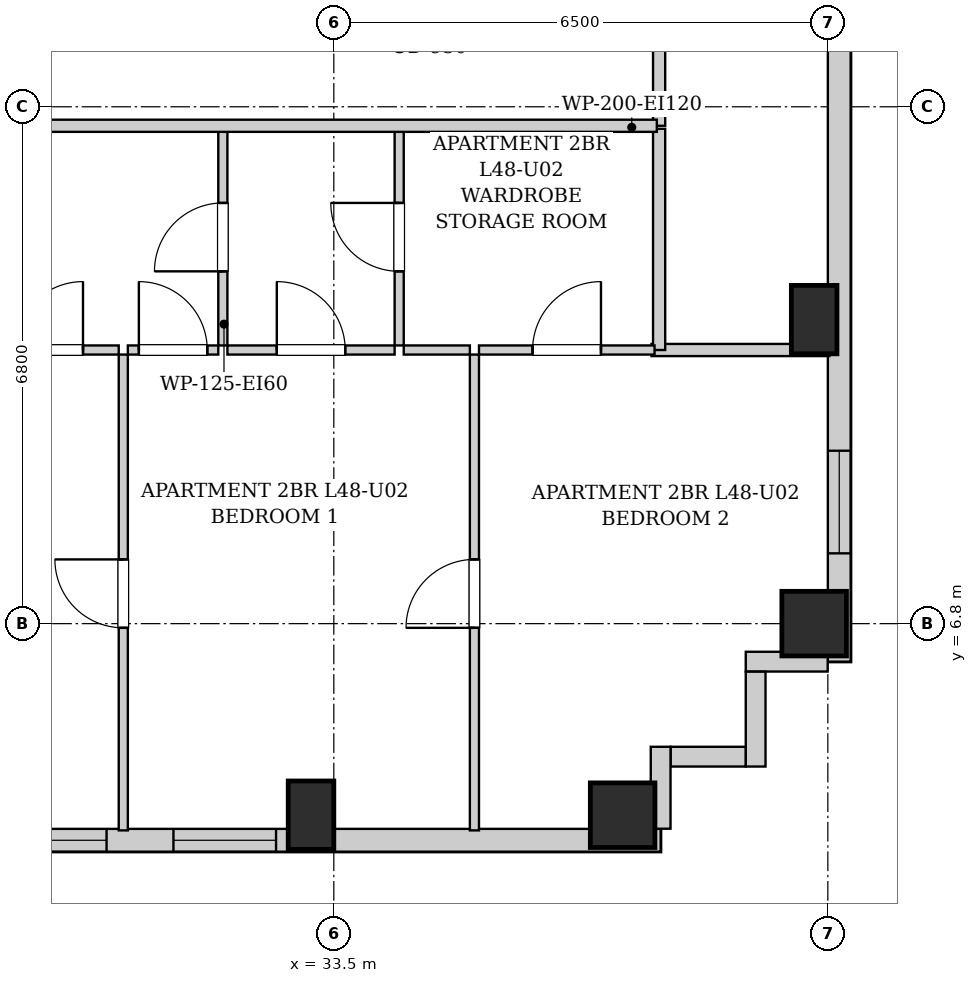
"""IFC4 building model, lengths in metres.
Left out: names, types, materials, properties, quantities, classifications, styles, units other than length and angle.
Written with IfcOpenShell. Run it as: python <this file> out.ifc"""

import sys

from ifc_helpers import new_model, si_unit, direction, frame, frame_2d, origin, origin_2d, place, context, subcontext, project, spatial, rectangle, extrude, element, fill, save


model = new_model("IFC4")
c1 = context("Model", 3, precision=1e-05, world=origin(), true_north=direction((0.0, 1.0)))
c2 = subcontext(c1, "Body", "Model", "MODEL_VIEW")
j1 = project(units=[si_unit("LENGTHUNIT", "METRE"), si_unit("PLANEANGLEUNIT", "RADIAN")], contexts=[c1])
p1 = place(None, origin())
s1 = spatial("IfcSite", under=j1, at=p1, CompositionType="ELEMENT")
p2 = place(p1, origin())
s2 = spatial("IfcBuilding", under=s1, at=p2, CompositionType="ELEMENT")
p3 = place(p2, frame((0.0, 0.0, 166.65)))
s3 = spatial("IfcBuildingStorey", under=s2, at=p3, CompositionType="ELEMENT", Elevation=166.65)
p4 = place(p3, frame((33.2, 4.28, 0.0), z_axis=(0.0, 0.0, 1.0), x_axis=(1.0, 0.0, 0.0)))
e1 = element("IfcColumn", 1, at=p4, inside=s3, PredefinedType="COLUMN", context=c2, shape_type="SweptSolid", body=[
    extrude(rectangle(XDim=0.6, YDim=0.9, at=origin_2d()), origin(), (0.0, 0.0, 1.0), 3.25),
])
for number, where, z_axis, x_axis in (
    (2, (37.3, 4.28, 0.0), (0.0, 0.0, 1.0), (1.0, 0.0, 0.0)),
    (3, (39.82, 6.8, 0.0), (0.0, 0.0, 1.0), (1.0, 0.0, 0.0)),
):
    element("IfcColumn", number, at=place(p3, frame(where, z_axis=z_axis, x_axis=x_axis)), inside=s3, PredefinedType="COLUMN", context=c2, shape_type="SweptSolid", body=[
        extrude(rectangle(XDim=0.85, YDim=0.85, at=origin_2d()), origin(), (0.0, 0.0, 1.0), 3.25),
    ])
p5 = place(p3, frame((39.82, 10.8, 0.0), z_axis=(0.0, 0.0, 1.0), x_axis=(1.0, 0.0, 0.0)))
e4 = element("IfcColumn", 4, at=p5, inside=s3, PredefinedType="COLUMN", context=c2, shape_type="SweptSolid", body=[
    extrude(rectangle(XDim=0.6, YDim=0.9, at=origin_2d()), origin(), (0.0, 0.0, 1.0), 3.25),
])
p6 = place(p3, frame((40.15, 40.8, 0.0), z_axis=(0.0, 0.0, 1.0), x_axis=(0.0, -1.0, 0.0)))
e5 = element("IfcWall", 5, at=p6, inside=s3, PredefinedType="SOLIDWALL", context=c2, shape_type="SweptSolid", body=[
    extrude(rectangle(XDim=34.5, YDim=0.3, at=frame_2d((17.25, 0.0))), origin(), (0.0, 0.0, 1.0), 2.93),
])
p7 = place(p6, frame((31.725, 0.0, 0.55)))
e6 = element("IfcOpeningElement", 6, at=p7, cuts=e5, PredefinedType="OPENING", context=c2, shape_type="SweptSolid", body=[
    extrude(rectangle(XDim=1.35, YDim=1.2, at=frame_2d((0.675, 0.6))), frame((0.0, 0.16, 0.0), z_axis=(0.0, -1.0, 0.0), x_axis=(1.0, 0.0, 0.0)), (0.0, 0.0, 1.0), 0.32),
])
p8 = place(p6, frame((3.0, 0.0, 0.55)))
e7 = element("IfcOpeningElement", 7, at=p8, cuts=e5, PredefinedType="OPENING", context=c2, shape_type="SweptSolid", body=[
    extrude(rectangle(XDim=1.35, YDim=1.2, at=frame_2d((0.675, 0.6))), frame((0.0, 0.16, 0.0), z_axis=(0.0, -1.0, 0.0), x_axis=(1.0, 0.0, 0.0)), (0.0, 0.0, 1.0), 0.32),
])
p9 = place(p6, frame((1.085, 0.0, 0.55)))
e8 = element("IfcOpeningElement", 8, at=p9, cuts=e5, PredefinedType="OPENING", context=c2, shape_type="SweptSolid", body=[
    extrude(rectangle(XDim=1.35, YDim=1.2, at=frame_2d((0.675, 0.6))), frame((0.0, 0.16, 0.0), z_axis=(0.0, -1.0, 0.0), x_axis=(1.0, 0.0, 0.0)), (0.0, 0.0, 1.0), 0.32),
])
p10 = place(p6, frame((21.3, 0.0, 0.55)))
e9 = element("IfcOpeningElement", 9, at=p10, cuts=e5, PredefinedType="OPENING", context=c2, shape_type="SweptSolid", body=[
    extrude(rectangle(XDim=1.35, YDim=1.2, at=frame_2d((0.675, 0.6))), frame((0.0, 0.16, 0.0), z_axis=(0.0, -1.0, 0.0), x_axis=(1.0, 0.0, 0.0)), (0.0, 0.0, 1.0), 0.32),
])
p11 = place(p6, frame((22.91, 0.0, 0.55)))
e10 = element("IfcOpeningElement", 10, at=p11, cuts=e5, PredefinedType="OPENING", context=c2, shape_type="SweptSolid", body=[
    extrude(rectangle(XDim=1.35, YDim=1.2, at=frame_2d((0.675, 0.6))), frame((0.0, 0.16, 0.0), z_axis=(0.0, -1.0, 0.0), x_axis=(1.0, 0.0, 0.0)), (0.0, 0.0, 1.0), 0.32),
])
p12 = place(p6, frame((14.175, 0.0, 0.55)))
e11 = element("IfcOpeningElement", 11, at=p12, cuts=e5, PredefinedType="OPENING", context=c2, shape_type="SweptSolid", body=[
    extrude(rectangle(XDim=1.35, YDim=1.2, at=frame_2d((0.675, 0.6))), frame((0.0, 0.16, 0.0), z_axis=(0.0, -1.0, 0.0), x_axis=(1.0, 0.0, 0.0)), (0.0, 0.0, 1.0), 0.32),
])
p13 = place(p6, frame((12.41, 0.0, 0.55)))
e12 = element("IfcOpeningElement", 12, at=p13, cuts=e5, PredefinedType="OPENING", context=c2, shape_type="SweptSolid", body=[
    extrude(rectangle(XDim=1.35, YDim=1.2, at=frame_2d((0.675, 0.6))), frame((0.0, 0.16, 0.0), z_axis=(0.0, -1.0, 0.0), x_axis=(1.0, 0.0, 0.0)), (0.0, 0.0, 1.0), 0.32),
])
p14 = place(p3, frame((37.8, 3.95, 0.0), z_axis=(0.0, 0.0, 1.0), x_axis=(-1.0, 0.0, 0.0)))
e13 = element("IfcWall", 13, at=p14, inside=s3, PredefinedType="SOLIDWALL", context=c2, shape_type="SweptSolid", body=[
    extrude(rectangle(XDim=20.15, YDim=0.3, at=frame_2d((10.075, 0.0))), origin(), (0.0, 0.0, 1.0), 2.93),
])
p15 = place(p14, frame((15.3, 0.0, 0.55)))
e14 = element("IfcOpeningElement", 14, at=p15, cuts=e13, PredefinedType="OPENING", context=c2, shape_type="SweptSolid", body=[
    extrude(rectangle(XDim=1.35, YDim=1.2, at=frame_2d((0.675, 0.6))), frame((0.0, 0.16, 0.0), z_axis=(0.0, -1.0, 0.0), x_axis=(1.0, 0.0, 0.0)), (0.0, 0.0, 1.0), 0.32),
])
p16 = place(p14, frame((16.91, 0.0, 0.55)))
e15 = element("IfcOpeningElement", 15, at=p16, cuts=e13, PredefinedType="OPENING", context=c2, shape_type="SweptSolid", body=[
    extrude(rectangle(XDim=1.35, YDim=1.2, at=frame_2d((0.675, 0.6))), frame((0.0, 0.16, 0.0), z_axis=(0.0, -1.0, 0.0), x_axis=(1.0, 0.0, 0.0)), (0.0, 0.0, 1.0), 0.32),
])
p17 = place(p14, frame((8.95, 0.0, 0.55)))
e16 = element("IfcOpeningElement", 16, at=p17, cuts=e13, PredefinedType="OPENING", context=c2, shape_type="SweptSolid", body=[
    extrude(rectangle(XDim=1.35, YDim=1.2, at=frame_2d((0.675, 0.6))), frame((0.0, 0.16, 0.0), z_axis=(0.0, -1.0, 0.0), x_axis=(1.0, 0.0, 0.0)), (0.0, 0.0, 1.0), 0.32),
])
p18 = place(p14, frame((7.29, 0.0, 0.55)))
e17 = element("IfcOpeningElement", 17, at=p18, cuts=e13, PredefinedType="OPENING", context=c2, shape_type="SweptSolid", body=[
    extrude(rectangle(XDim=1.35, YDim=1.2, at=frame_2d((0.675, 0.6))), frame((0.0, 0.16, 0.0), z_axis=(0.0, -1.0, 0.0), x_axis=(1.0, 0.0, 0.0)), (0.0, 0.0, 1.0), 0.32),
])
p19 = place(p14, frame((5.06, 0.0, 0.55)))
e18 = element("IfcOpeningElement", 18, at=p19, cuts=e13, PredefinedType="OPENING", context=c2, shape_type="SweptSolid", body=[
    extrude(rectangle(XDim=1.35, YDim=1.2, at=frame_2d((0.675, 0.6))), frame((0.0, 0.16, 0.0), z_axis=(0.0, -1.0, 0.0), x_axis=(1.0, 0.0, 0.0)), (0.0, 0.0, 1.0), 0.32),
])
p20 = place(p3, frame((39.998, 6.3, 0.0), z_axis=(0.0, 0.0, 1.0), x_axis=(-1.0, 0.0, 0.0)))
e19 = element("IfcWall", 19, at=p20, inside=s3, PredefinedType="SOLIDWALL", context=c2, shape_type="SweptSolid", body=[
    extrude(rectangle(XDim=1.078, YDim=0.26, at=frame_2d((0.539, 0.0))), origin(), (0.0, 0.0, 1.0), 2.93),
])
p21 = place(p3, frame((39.05, 6.168, 0.0), z_axis=(0.0, 0.0, 1.0), x_axis=(0.0, -1.0, 0.0)))
e20 = element("IfcWall", 20, at=p21, inside=s3, PredefinedType="SOLIDWALL", context=c2, shape_type="SweptSolid", body=[
    extrude(rectangle(XDim=1.248, YDim=0.26, at=frame_2d((0.624, 0.0))), origin(), (0.0, 0.0, 1.0), 2.93),
])
p22 = place(p3, frame((38.918, 5.05, 0.0), z_axis=(0.0, 0.0, 1.0), x_axis=(-1.0, 0.0, 0.0)))
e21 = element("IfcWall", 21, at=p22, inside=s3, PredefinedType="SOLIDWALL", context=c2, shape_type="SweptSolid", body=[
    extrude(rectangle(XDim=0.986, YDim=0.26, at=frame_2d((0.493, 0.0))), origin(), (0.0, 0.0, 1.0), 2.93),
])
p23 = place(p3, frame((37.8, 5.18, 0.0), z_axis=(0.0, 0.0, 1.0), x_axis=(0.0, -1.0, 0.0)))
e22 = element("IfcWall", 22, at=p23, inside=s3, PredefinedType="SOLIDWALL", context=c2, shape_type="SweptSolid", body=[
    extrude(rectangle(XDim=1.078, YDim=0.26, at=frame_2d((0.539, 0.0))), origin(), (0.0, 0.0, 1.0), 2.93),
])
p24 = place(p3, frame((37.78, 13.35, 0.0), z_axis=(0.0, 0.0, 1.0), x_axis=(0.0, 1.0, 0.0)))
e23 = element("IfcWall", 23, at=p24, inside=s3, PredefinedType="PARTITIONING", context=c2, shape_type="SweptSolid", body=[
    extrude(rectangle(XDim=1.74, YDim=0.16, at=frame_2d((0.87, 0.0))), origin(), (0.0, 0.0, 1.0), 2.93),
])
p25 = place(p3, frame((37.68, 10.4, 0.0), z_axis=(0.0, 0.0, 1.0), x_axis=(1.0, 0.0, 0.0)))
e24 = element("IfcWall", 24, at=p25, inside=s3, PredefinedType="PARTITIONING", context=c2, shape_type="SweptSolid", body=[
    extrude(rectangle(XDim=2.34, YDim=0.16, at=frame_2d((1.17, 0.0))), origin(), (0.0, 0.0, 1.0), 2.93),
])
p26 = place(p3, frame((37.78, 10.4, 0.0), z_axis=(0.0, 0.0, 1.0), x_axis=(0.0, 1.0, 0.0)))
e25 = element("IfcWall", 25, at=p26, inside=s3, PredefinedType="PARTITIONING", context=c2, shape_type="SweptSolid", body=[
    extrude(rectangle(XDim=2.91, YDim=0.16, at=frame_2d((1.455, 0.0))), origin(), (0.0, 0.0, 1.0), 2.93),
])
p27 = place(p3, frame((32.04, 10.46, 0.0), z_axis=(0.0, 0.0, 1.0), x_axis=(0.0, 1.0, 0.0)))
e26 = element("IfcWall", 26, at=p27, inside=s3, PredefinedType="PARTITIONING", context=c2, shape_type="SweptSolid", body=[
    extrude(rectangle(XDim=2.85, YDim=0.12, at=frame_2d((1.425, 0.0))), origin(), (0.0, 0.0, 1.0), 2.93),
])
p28 = place(p27, frame((0.975, 0.0, 0.0)))
e27 = element("IfcOpeningElement", 27, at=p28, cuts=e26, PredefinedType="OPENING", context=c2, shape_type="SweptSolid", body=[
    extrude(rectangle(XDim=0.9, YDim=2.05, at=frame_2d((0.45, 1.025))), frame((0.0, 0.07, 0.0), z_axis=(0.0, -1.0, 0.0), x_axis=(1.0, 0.0, 0.0)), (0.0, 0.0, 1.0), 0.14),
])
p29 = place(p3, frame((28.83, 10.4, 0.0), z_axis=(0.0, 0.0, 1.0), x_axis=(1.0, 0.0, 0.0)))
e28 = element("IfcWall", 28, at=p29, inside=s3, PredefinedType="PARTITIONING", context=c2, shape_type="SweptSolid", body=[
    extrude(rectangle(XDim=1.84, YDim=0.12, at=frame_2d((0.92, 0.0))), origin(), (0.0, 0.0, 1.0), 2.93),
])
p30 = place(p29, frame((0.47, 0.0, 0.0)))
e29 = element("IfcOpeningElement", 29, at=p30, cuts=e28, PredefinedType="OPENING", context=c2, shape_type="SweptSolid", body=[
    extrude(rectangle(XDim=0.9, YDim=2.05, at=frame_2d((0.45, 1.025))), frame((0.0, 0.07, 0.0), z_axis=(0.0, -1.0, 0.0), x_axis=(1.0, 0.0, 0.0)), (0.0, 0.0, 1.0), 0.14),
])
p31 = place(p3, frame((30.79, 10.4, 0.0), z_axis=(0.0, 0.0, 1.0), x_axis=(1.0, 0.0, 0.0)))
e30 = element("IfcWall", 30, at=p31, inside=s3, PredefinedType="PARTITIONING", context=c2, shape_type="SweptSolid", body=[
    extrude(rectangle(XDim=1.19, YDim=0.12, at=frame_2d((0.595, 0.0))), origin(), (0.0, 0.0, 1.0), 2.93),
])
p32 = place(p31, frame((0.145, 0.0, 0.0)))
e31 = element("IfcOpeningElement", 31, at=p32, cuts=e30, PredefinedType="OPENING", context=c2, shape_type="SweptSolid", body=[
    extrude(rectangle(XDim=0.9, YDim=2.05, at=frame_2d((0.45, 1.025))), frame((0.0, 0.07, 0.0), z_axis=(0.0, -1.0, 0.0), x_axis=(1.0, 0.0, 0.0)), (0.0, 0.0, 1.0), 0.14),
])
p33 = place(p3, frame((34.36, 10.46, 0.0), z_axis=(0.0, 0.0, 1.0), x_axis=(0.0, 1.0, 0.0)))
e32 = element("IfcWall", 32, at=p33, inside=s3, PredefinedType="PARTITIONING", context=c2, shape_type="SweptSolid", body=[
    extrude(rectangle(XDim=2.85, YDim=0.12, at=frame_2d((1.425, 0.0))), origin(), (0.0, 0.0, 1.0), 2.93),
])
p34 = place(p33, frame((0.975, 0.0, 0.0)))
e33 = element("IfcOpeningElement", 33, at=p34, cuts=e32, PredefinedType="OPENING", context=c2, shape_type="SweptSolid", body=[
    extrude(rectangle(XDim=0.9, YDim=2.05, at=frame_2d((0.45, 1.025))), frame((0.0, 0.07, 0.0), z_axis=(0.0, -1.0, 0.0), x_axis=(1.0, 0.0, 0.0)), (0.0, 0.0, 1.0), 0.14),
])
p35 = place(p3, frame((32.1, 10.4, 0.0), z_axis=(0.0, 0.0, 1.0), x_axis=(1.0, 0.0, 0.0)))
e34 = element("IfcWall", 34, at=p35, inside=s3, PredefinedType="PARTITIONING", context=c2, shape_type="SweptSolid", body=[
    extrude(rectangle(XDim=2.2, YDim=0.12, at=frame_2d((1.1, 0.0))), origin(), (0.0, 0.0, 1.0), 2.93),
])
p36 = place(p35, frame((0.65, 0.0, 0.0)))
e35 = element("IfcOpeningElement", 35, at=p36, cuts=e34, PredefinedType="OPENING", context=c2, shape_type="SweptSolid", body=[
    extrude(rectangle(XDim=0.9, YDim=2.05, at=frame_2d((0.45, 1.025))), frame((0.0, 0.07, 0.0), z_axis=(0.0, -1.0, 0.0), x_axis=(1.0, 0.0, 0.0)), (0.0, 0.0, 1.0), 0.14),
])
p37 = place(p3, frame((34.42, 10.4, 0.0), z_axis=(0.0, 0.0, 1.0), x_axis=(1.0, 0.0, 0.0)))
e36 = element("IfcWall", 36, at=p37, inside=s3, PredefinedType="PARTITIONING", context=c2, shape_type="SweptSolid", body=[
    extrude(rectangle(XDim=0.87, YDim=0.12, at=frame_2d((0.435, 0.0))), origin(), (0.0, 0.0, 1.0), 2.93),
])
p38 = place(p3, frame((35.41, 10.4, 0.0), z_axis=(0.0, 0.0, 1.0), x_axis=(1.0, 0.0, 0.0)))
e37 = element("IfcWall", 37, at=p38, inside=s3, PredefinedType="PARTITIONING", context=c2, shape_type="SweptSolid", body=[
    extrude(rectangle(XDim=2.31, YDim=0.12, at=frame_2d((1.155, 0.0))), origin(), (0.0, 0.0, 1.0), 2.93),
])
p39 = place(p38, frame((0.705, 0.0, 0.0)))
e38 = element("IfcOpeningElement", 38, at=p39, cuts=e37, PredefinedType="OPENING", context=c2, shape_type="SweptSolid", body=[
    extrude(rectangle(XDim=0.9, YDim=2.05, at=frame_2d((0.45, 1.025))), frame((0.0, 0.07, 0.0), z_axis=(0.0, -1.0, 0.0), x_axis=(1.0, 0.0, 0.0)), (0.0, 0.0, 1.0), 0.14),
])
p40 = place(p3, frame((30.73, 4.08, 0.0), z_axis=(0.0, 0.0, 1.0), x_axis=(0.0, 1.0, 0.0)))
e39 = element("IfcWall", 39, at=p40, inside=s3, PredefinedType="PARTITIONING", context=c2, shape_type="SweptSolid", body=[
    extrude(rectangle(XDim=6.26, YDim=0.12, at=frame_2d((3.13, 0.0))), origin(), (0.0, 0.0, 1.0), 2.93),
])
p41 = place(p40, frame((2.665, 0.0, 0.0)))
e40 = element("IfcOpeningElement", 40, at=p41, cuts=e39, PredefinedType="OPENING", context=c2, shape_type="SweptSolid", body=[
    extrude(rectangle(XDim=0.9, YDim=2.05, at=frame_2d((0.45, 1.025))), frame((0.0, 0.07, 0.0), z_axis=(0.0, -1.0, 0.0), x_axis=(1.0, 0.0, 0.0)), (0.0, 0.0, 1.0), 0.14),
])
p42 = place(p3, frame((35.35, 4.08, 0.0), z_axis=(0.0, 0.0, 1.0), x_axis=(0.0, 1.0, 0.0)))
e41 = element("IfcWall", 41, at=p42, inside=s3, PredefinedType="PARTITIONING", context=c2, shape_type="SweptSolid", body=[
    extrude(rectangle(XDim=6.26, YDim=0.12, at=frame_2d((3.13, 0.0))), origin(), (0.0, 0.0, 1.0), 2.93),
])
p43 = place(p42, frame((2.665, 0.0, 0.0)))
e42 = element("IfcOpeningElement", 42, at=p43, cuts=e41, PredefinedType="OPENING", context=c2, shape_type="SweptSolid", body=[
    extrude(rectangle(XDim=0.9, YDim=2.05, at=frame_2d((0.45, 1.025))), frame((0.0, 0.07, 0.0), z_axis=(0.0, -1.0, 0.0), x_axis=(1.0, 0.0, 0.0)), (0.0, 0.0, 1.0), 0.14),
])
p44 = place(p3, frame((10.05, 13.35, 0.0), z_axis=(0.0, 0.0, 1.0), x_axis=(1.0, 0.0, 0.0)))
e43 = element("IfcWall", 43, at=p44, inside=s3, PredefinedType="PARTITIONING", context=c2, shape_type="SweptSolid", body=[
    extrude(rectangle(XDim=27.7, YDim=0.16, at=frame_2d((13.85, 0.0))), origin(), (0.0, 0.0, 1.0), 2.93),
])
p45 = place(p44, frame((3.8, 0.0, 0.0)))
e44 = element("IfcOpeningElement", 44, at=p45, cuts=e43, PredefinedType="OPENING", context=c2, shape_type="SweptSolid", body=[
    extrude(rectangle(XDim=0.95, YDim=2.1, at=frame_2d((0.475, 1.05))), frame((0.0, 0.09, 0.0), z_axis=(0.0, -1.0, 0.0), x_axis=(1.0, 0.0, 0.0)), (0.0, 0.0, 1.0), 0.18),
])
p46 = place(p44, frame((12.695, 0.0, 0.0)))
e45 = element("IfcOpeningElement", 45, at=p46, cuts=e43, PredefinedType="OPENING", context=c2, shape_type="SweptSolid", body=[
    extrude(rectangle(XDim=0.95, YDim=2.1, at=frame_2d((0.475, 1.05))), frame((0.0, 0.09, 0.0), z_axis=(0.0, -1.0, 0.0), x_axis=(1.0, 0.0, 0.0)), (0.0, 0.0, 1.0), 0.18),
])
p47 = place(p28, origin())
e46 = element("IfcDoor", 46, at=p47, inside=s3, OperationType="SINGLE_SWING_LEFT", PredefinedType="DOOR", context=c2, shape_type="SweptSolid", body=[
    extrude(rectangle(XDim=0.9, YDim=2.05, at=frame_2d((0.45, 1.025))), frame((0.0, 0.025, 0.0), z_axis=(0.0, -1.0, 0.0), x_axis=(1.0, 0.0, 0.0)), (0.0, 0.0, 1.0), 0.05),
])
fill(e27, e46)
p48 = place(p30, origin())
e47 = element("IfcDoor", 47, at=p48, inside=s3, OperationType="SINGLE_SWING_RIGHT", PredefinedType="DOOR", context=c2, shape_type="SweptSolid", body=[
    extrude(rectangle(XDim=0.9, YDim=2.05, at=frame_2d((0.45, 1.025))), frame((0.0, 0.025, 0.0), z_axis=(0.0, -1.0, 0.0), x_axis=(1.0, 0.0, 0.0)), (0.0, 0.0, 1.0), 0.05),
])
fill(e29, e47)
p49 = place(p32, origin())
e48 = element("IfcDoor", 48, at=p49, inside=s3, OperationType="SINGLE_SWING_LEFT", PredefinedType="DOOR", context=c2, shape_type="SweptSolid", body=[
    extrude(rectangle(XDim=0.9, YDim=2.05, at=frame_2d((0.45, 1.025))), frame((0.0, 0.025, 0.0), z_axis=(0.0, -1.0, 0.0), x_axis=(1.0, 0.0, 0.0)), (0.0, 0.0, 1.0), 0.05),
])
fill(e31, e48)
p50 = place(p34, origin())
e49 = element("IfcDoor", 49, at=p50, inside=s3, OperationType="SINGLE_SWING_RIGHT", PredefinedType="DOOR", context=c2, shape_type="SweptSolid", body=[
    extrude(rectangle(XDim=0.9, YDim=2.05, at=frame_2d((0.45, 1.025))), frame((0.0, 0.025, 0.0), z_axis=(0.0, -1.0, 0.0), x_axis=(1.0, 0.0, 0.0)), (0.0, 0.0, 1.0), 0.05),
])
fill(e33, e49)
p51 = place(p36, origin())
e50 = element("IfcDoor", 50, at=p51, inside=s3, OperationType="SINGLE_SWING_LEFT", PredefinedType="DOOR", context=c2, shape_type="SweptSolid", body=[
    extrude(rectangle(XDim=0.9, YDim=2.05, at=frame_2d((0.45, 1.025))), frame((0.0, 0.025, 0.0), z_axis=(0.0, -1.0, 0.0), x_axis=(1.0, 0.0, 0.0)), (0.0, 0.0, 1.0), 0.05),
])
fill(e35, e50)
p52 = place(p39, origin())
e51 = element("IfcDoor", 51, at=p52, inside=s3, OperationType="SINGLE_SWING_RIGHT", PredefinedType="DOOR", context=c2, shape_type="SweptSolid", body=[
    extrude(rectangle(XDim=0.9, YDim=2.05, at=frame_2d((0.45, 1.025))), frame((0.0, 0.025, 0.0), z_axis=(0.0, -1.0, 0.0), x_axis=(1.0, 0.0, 0.0)), (0.0, 0.0, 1.0), 0.05),
])
fill(e38, e51)
p53 = place(p41, origin())
e52 = element("IfcDoor", 52, at=p53, inside=s3, OperationType="SINGLE_SWING_RIGHT", PredefinedType="DOOR", context=c2, shape_type="SweptSolid", body=[
    extrude(rectangle(XDim=0.9, YDim=2.05, at=frame_2d((0.45, 1.025))), frame((0.0, 0.025, 0.0), z_axis=(0.0, -1.0, 0.0), x_axis=(1.0, 0.0, 0.0)), (0.0, 0.0, 1.0), 0.05),
])
fill(e40, e52)
p54 = place(p43, origin())
e53 = element("IfcDoor", 53, at=p54, inside=s3, OperationType="SINGLE_SWING_LEFT", PredefinedType="DOOR", context=c2, shape_type="SweptSolid", body=[
    extrude(rectangle(XDim=0.9, YDim=2.05, at=frame_2d((0.45, 1.025))), frame((0.0, 0.025, 0.0), z_axis=(0.0, -1.0, 0.0), x_axis=(1.0, 0.0, 0.0)), (0.0, 0.0, 1.0), 0.05),
])
fill(e42, e53)
p55 = place(p18, origin())
e54 = element("IfcWindow", 54, at=p55, inside=s3, PartitioningType="SINGLE_PANEL", PredefinedType="WINDOW", context=c2, shape_type="SweptSolid", body=[
    extrude(rectangle(XDim=1.35, YDim=1.2, at=frame_2d((0.675, 0.6))), frame((0.0, 0.03, 0.0), z_axis=(0.0, -1.0, 0.0), x_axis=(1.0, 0.0, 0.0)), (0.0, 0.0, 1.0), 0.06),
])
fill(e17, e54)
p56 = place(p19, origin())
e55 = element("IfcWindow", 55, at=p56, inside=s3, PartitioningType="SINGLE_PANEL", PredefinedType="WINDOW", context=c2, shape_type="SweptSolid", body=[
    extrude(rectangle(XDim=1.35, YDim=1.2, at=frame_2d((0.675, 0.6))), frame((0.0, 0.03, 0.0), z_axis=(0.0, -1.0, 0.0), x_axis=(1.0, 0.0, 0.0)), (0.0, 0.0, 1.0), 0.06),
])
fill(e18, e55)
p57 = place(p7, origin())
e56 = element("IfcWindow", 56, at=p57, inside=s3, PartitioningType="SINGLE_PANEL", PredefinedType="WINDOW", context=c2, shape_type="SweptSolid", body=[
    extrude(rectangle(XDim=1.35, YDim=1.2, at=frame_2d((0.675, 0.6))), frame((0.0, 0.03, 0.0), z_axis=(0.0, -1.0, 0.0), x_axis=(1.0, 0.0, 0.0)), (0.0, 0.0, 1.0), 0.06),
])
fill(e6, e56)
save(model, sys.argv[1])
